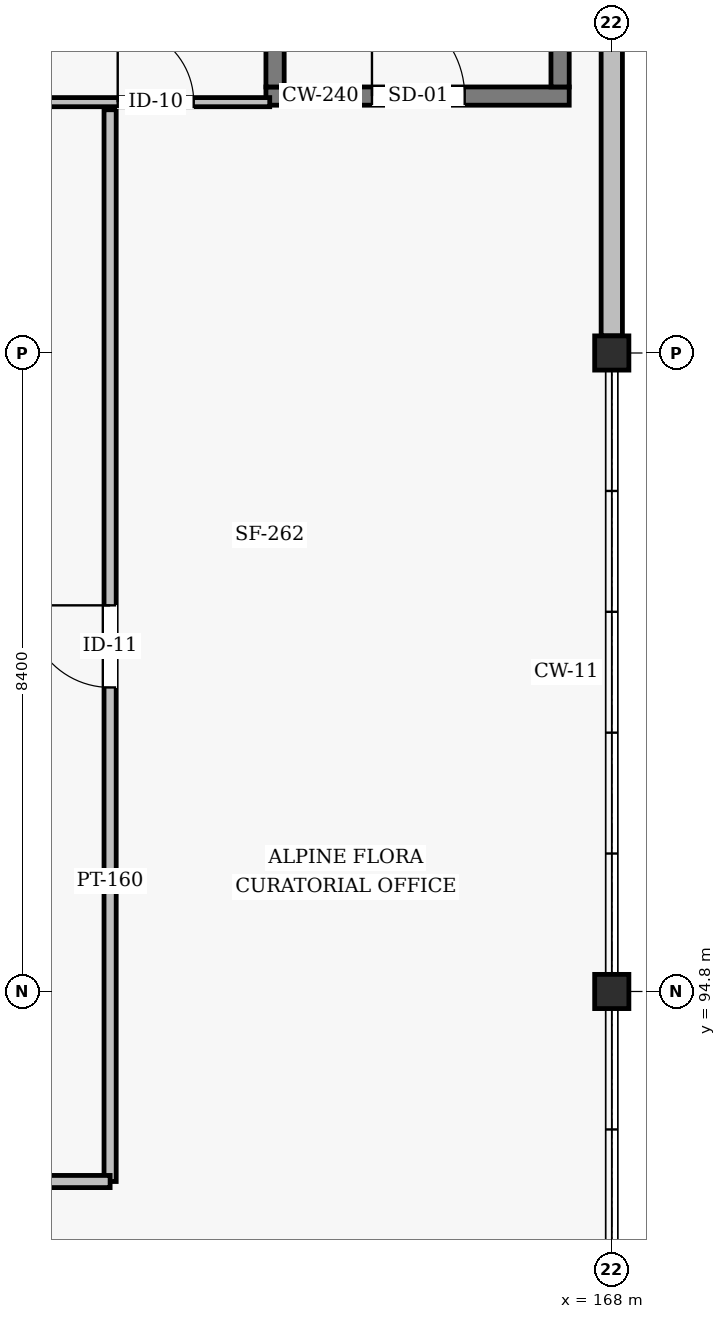
"""IFC4 building model, lengths in metres.
Left out: names, types, materials, properties, quantities, classifications, styles, units other than length and angle.
Written with IfcOpenShell. Run it as: python <this file> out.ifc"""

import sys

from ifc_helpers import new_model, si_unit, direction, frame, frame_2d, origin, origin_2d, place, context, subcontext, project, spatial, rectangle, hollow_rectangle, extrude, element, fill, save


model = new_model("IFC4")
c1 = context("Model", 3, precision=1e-05, world=origin(), true_north=direction((0.0, 1.0)))
c2 = subcontext(c1, "Body", "Model", "MODEL_VIEW")
j1 = project(units=[si_unit("LENGTHUNIT", "METRE"), si_unit("PLANEANGLEUNIT", "RADIAN")], contexts=[c1])
p1 = place(None, origin())
s1 = spatial("IfcSite", under=j1, at=p1, CompositionType="ELEMENT")
p2 = place(p1, origin())
s2 = spatial("IfcBuilding", under=s1, at=p2, CompositionType="ELEMENT")
p3 = place(p2, frame((0.0, 0.0, 50.4)))
s3 = spatial("IfcBuildingStorey", under=s2, at=p3, CompositionType="ELEMENT", Elevation=50.4)
for number, where, z_axis, x_axis in (
    (1, (168.0, 94.8, 0.0), (0.0, 0.0, 1.0), (1.0, 0.0, 0.0)),
    (2, (168.0, 103.2, 0.0), (0.0, 0.0, 1.0), (1.0, 0.0, 0.0)),
):
    element("IfcColumn", number, at=place(p3, frame(where, z_axis=z_axis, x_axis=x_axis)), inside=s3, PredefinedType="COLUMN", context=c2, shape_type="SweptSolid", body=[
        extrude(hollow_rectangle(XDim=0.45, YDim=0.45, WallThickness=0.018, InnerFilletRadius=0.018, OuterFilletRadius=0.036, at=origin_2d()), origin(), (0.0, 0.0, 1.0), 3.6),
    ])
p4 = place(p3, frame((168.0, 103.425, 0.0), z_axis=(0.0, 0.0, 1.0), x_axis=(0.0, 1.0, 0.0)))
e3 = element("IfcWall", 3, at=p4, inside=s3, PredefinedType="SOLIDWALL", context=c2, shape_type="SweptSolid", body=[
    extrude(rectangle(XDim=11.55, YDim=0.28, at=frame_2d((5.775, 0.0))), origin(), (0.0, 0.0, 1.0), 2.554),
])
p5 = place(p3, frame((163.45, 106.58, 0.0), z_axis=(0.0, 0.0, 1.0), x_axis=(1.0, 0.0, 0.0)))
e4 = element("IfcWall", 4, at=p5, inside=s3, PredefinedType="SHEAR", context=c2, shape_type="SweptSolid", body=[
    extrude(rectangle(XDim=3.99, YDim=0.24, at=frame_2d((1.995, 0.0))), origin(), (0.0, 0.0, 1.0), 3.346),
])
p6 = place(p5, frame((1.395, 0.0, 0.0)))
e5 = element("IfcOpeningElement", 5, at=p6, cuts=e4, PredefinedType="OPENING", context=c2, shape_type="SweptSolid", body=[
    extrude(rectangle(XDim=1.22, YDim=2.18, at=frame_2d((0.61, 1.09))), frame((0.0, 0.13, 0.0), z_axis=(0.0, -1.0, 0.0), x_axis=(1.0, 0.0, 0.0)), (0.0, 0.0, 1.0), 0.26),
])
for number, where, z_axis, x_axis in (
    (6, (163.57, 106.7, 0.0), (0.0, 0.0, 1.0), (0.0, 1.0, 0.0)),
    (7, (167.32, 106.7, 0.0), (0.0, 0.0, 1.0), (0.0, 1.0, 0.0)),
):
    element("IfcWall", number, at=place(p3, frame(where, z_axis=z_axis, x_axis=x_axis)), inside=s3, PredefinedType="SHEAR", context=c2, shape_type="SweptSolid", body=[
        extrude(rectangle(XDim=7.9, YDim=0.24, at=frame_2d((3.95, 0.0))), origin(), (0.0, 0.0, 1.0), 3.346),
    ])
p7 = place(p3, frame((160.5, 106.5, 0.0), z_axis=(0.0, 0.0, 1.0), x_axis=(1.0, 0.0, 0.0)))
e8 = element("IfcWall", 8, at=p7, inside=s3, PredefinedType="PARTITIONING", context=c2, shape_type="SweptSolid", body=[
    extrude(rectangle(XDim=3.0, YDim=0.12, at=frame_2d((1.5, 0.0))), origin(), (0.0, 0.0, 1.0), 3.346),
])
p8 = place(p7, frame((1.0, 0.0, 0.0)))
e9 = element("IfcOpeningElement", 9, at=p8, cuts=e8, PredefinedType="OPENING", context=c2, shape_type="SweptSolid", body=[
    extrude(rectangle(XDim=1.0, YDim=2.1, at=frame_2d((0.5, 1.05))), frame((0.0, 0.07, 0.0), z_axis=(0.0, -1.0, 0.0), x_axis=(1.0, 0.0, 0.0)), (0.0, 0.0, 1.0), 0.14),
])
p9 = place(p3, frame((161.4, 92.3, 0.0), z_axis=(0.0, 0.0, 1.0), x_axis=(0.0, 1.0, 0.0)))
e10 = element("IfcWall", 10, at=p9, inside=s3, PredefinedType="PARTITIONING", context=c2, shape_type="SweptSolid", body=[
    extrude(rectangle(XDim=14.1, YDim=0.16, at=frame_2d((7.05, 0.0))), origin(), (0.0, 0.0, 1.0), 2.75),
])
p10 = place(p9, frame((6.5, 0.0, 0.0)))
e11 = element("IfcOpeningElement", 11, at=p10, cuts=e10, PredefinedType="OPENING", context=c2, shape_type="SweptSolid", body=[
    extrude(rectangle(XDim=1.08, YDim=2.08, at=frame_2d((0.54, 1.04))), frame((0.0, 0.09, 0.0), z_axis=(0.0, -1.0, 0.0), x_axis=(1.0, 0.0, 0.0)), (0.0, 0.0, 1.0), 0.18),
])
p11 = place(p3, frame((146.5, 92.3, 0.0), z_axis=(0.0, 0.0, 1.0), x_axis=(1.0, 0.0, 0.0)))
e12 = element("IfcWall", 12, at=p11, inside=s3, PredefinedType="PARTITIONING", context=c2, shape_type="SweptSolid", body=[
    extrude(rectangle(XDim=14.9, YDim=0.16, at=frame_2d((7.45, 0.0))), origin(), (0.0, 0.0, 1.0), 2.846),
])
p12 = place(p11, frame((6.9, 0.0, 0.0)))
e13 = element("IfcOpeningElement", 13, at=p12, cuts=e12, PredefinedType="OPENING", context=c2, shape_type="SweptSolid", body=[
    extrude(rectangle(XDim=1.08, YDim=2.08, at=frame_2d((0.54, 1.04))), frame((0.0, 0.09, 0.0), z_axis=(0.0, -1.0, 0.0), x_axis=(1.0, 0.0, 0.0)), (0.0, 0.0, 1.0), 0.18),
])
p13 = place(p6, origin())
e14 = element("IfcDoor", 14, at=p13, inside=s3, OperationType="SINGLE_SWING_LEFT", PredefinedType="DOOR", context=c2, shape_type="SweptSolid", body=[
    extrude(rectangle(XDim=1.22, YDim=2.18, at=frame_2d((0.61, 1.09))), frame((0.0, 0.025, 0.0), z_axis=(0.0, -1.0, 0.0), x_axis=(1.0, 0.0, 0.0)), (0.0, 0.0, 1.0), 0.05),
])
fill(e5, e14)
p14 = place(p8, origin())
e15 = element("IfcDoor", 15, at=p14, inside=s3, OperationType="SINGLE_SWING_LEFT", PredefinedType="DOOR", context=c2, shape_type="SweptSolid", body=[
    extrude(rectangle(XDim=1.0, YDim=2.1, at=frame_2d((0.5, 1.05))), frame((0.0, 0.025, 0.0), z_axis=(0.0, -1.0, 0.0), x_axis=(1.0, 0.0, 0.0)), (0.0, 0.0, 1.0), 0.05),
])
fill(e9, e15)
p15 = place(p10, origin())
e16 = element("IfcDoor", 16, at=p15, inside=s3, OperationType="SINGLE_SWING_RIGHT", PredefinedType="DOOR", context=c2, shape_type="SweptSolid", body=[
    extrude(rectangle(XDim=1.08, YDim=2.08, at=frame_2d((0.54, 1.04))), frame((0.0, 0.025, 0.0), z_axis=(0.0, -1.0, 0.0), x_axis=(1.0, 0.0, 0.0)), (0.0, 0.0, 1.0), 0.05),
])
fill(e11, e16)
save(model, sys.argv[1])
